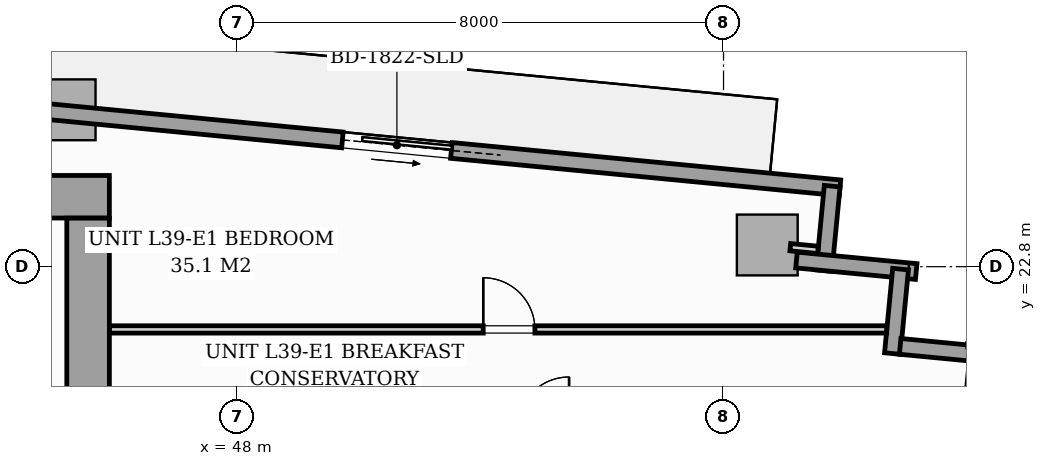
"""IFC4 building model, lengths in metres.
Left out: names, types, materials, properties, quantities, classifications, styles, units other than length and angle.
Written with IfcOpenShell. Run it as: python <this file> out.ifc"""

import sys

from ifc_helpers import new_model, si_unit, direction, frame, frame_2d, origin, origin_2d, place, context, subcontext, project, spatial, rectangle, i_section, extrude, source, transform, mapped, element, fill, save


model = new_model("IFC4")
c1 = context("Model", 3, precision=1e-05, world=origin(), true_north=direction((0.0, 1.0)))
c2 = subcontext(c1, "Body", "Model", "MODEL_VIEW")
j1 = project(units=[si_unit("LENGTHUNIT", "METRE"), si_unit("PLANEANGLEUNIT", "RADIAN")], contexts=[c1])
p1 = place(None, origin())
s1 = spatial("IfcSite", under=j1, at=p1, CompositionType="ELEMENT")
p2 = place(p1, origin())
s2 = spatial("IfcBuilding", under=s1, at=p2, CompositionType="ELEMENT")
p3 = place(p2, frame((0.0, 0.0, 137.4)))
s3 = spatial("IfcBuildingStorey", under=s2, at=p3, CompositionType="ELEMENT", Elevation=137.4)
m1 = source(origin(), c2, "Body", "SweptSolid", [
    extrude(i_section(OverallWidth=0.421, OverallDepth=0.465, WebThickness=0.045, FlangeThickness=0.073, FilletRadius=0.018, at=origin_2d()), origin(), (0.0, 0.0, 1.0), 3.196),
])
p4 = place(p3, frame((45.6, 24.0, 0.002), z_axis=(0.0, 0.0, 1.0), x_axis=(1.0, 0.0, 0.0)))
e1 = element("IfcColumn", 1, at=p4, inside=s3, PredefinedType="PILASTER", context=c2, shape_type="MappedRepresentation", body=[
    mapped(m1, transform((0.0, 0.0, 0.0), scale=1.0)),
])
m2 = source(origin(), c2, "Body", "SweptSolid", [
    extrude(rectangle(XDim=1.0, YDim=1.0, at=origin_2d()), origin(), (0.0, 0.0, 1.0), 3.196),
])
for number, where, z_axis, x_axis in (
    (2, (45.173, 25.38, 0.002), (0.0, 0.0, 1.0), (0.995, -0.096, 0.0)),
    (3, (56.719, 23.157, 0.002), (0.0, 0.0, 1.0), (0.995, -0.096, 0.0)),
):
    element("IfcColumn", number, at=place(p3, frame(where, z_axis=z_axis, x_axis=x_axis)), inside=s3, PredefinedType="COLUMN", context=c2, shape_type="MappedRepresentation", body=[
        mapped(m2, transform((0.0, 0.0, 0.0), scale=1.0)),
    ])
p5 = place(p3, frame((40.983, 25.727, 0.0), z_axis=(0.0, 0.0, 1.0), x_axis=(0.995395844771, -0.095849424686, 0.0)))
e4 = element("IfcWall", 4, at=p5, inside=s3, PredefinedType="STANDARD", context=c2, shape_type="SweptSolid", body=[
    extrude(rectangle(XDim=17.01, YDim=0.26, at=frame_2d((8.505, 0.0))), origin(), (0.0, 0.0, 1.0), 2.94),
])
p6 = place(p5, frame((8.79, 0.0, 0.0)))
e5 = element("IfcOpeningElement", 5, at=p6, cuts=e4, PredefinedType="OPENING", context=c2, shape_type="SweptSolid", body=[
    extrude(rectangle(XDim=1.8, YDim=2.06, at=frame_2d((0.9, 1.03))), frame((0.0, 0.14, 0.0), z_axis=(0.0, -1.0, 0.0), x_axis=(1.0, 0.0, 0.0)), (0.0, 0.0, 1.0), 0.28),
])
p7 = place(p5, frame((0.7, 0.0, 0.65)))
e6 = element("IfcOpeningElement", 6, at=p7, cuts=e4, PredefinedType="OPENING", context=c2, shape_type="SweptSolid", body=[
    extrude(rectangle(XDim=1.6, YDim=1.5, at=frame_2d((0.8, 0.75))), frame((0.0, 0.14, 0.0), z_axis=(0.0, -1.0, 0.0), x_axis=(1.0, 0.0, 0.0)), (0.0, 0.0, 1.0), 0.28),
])
p8 = place(p3, frame((57.787, 24.124, 0.0), z_axis=(0.0, 0.0, 1.0), x_axis=(-0.095915846097, -0.995389446633, 0.0)))
e7 = element("IfcWall", 7, at=p8, inside=s3, PredefinedType="STANDARD", context=c2, shape_type="SweptSolid", body=[
    extrude(rectangle(XDim=1.395, YDim=0.26, at=frame_2d((0.697, 0.0))), origin(), (0.0, 0.0, 1.0), 2.94),
])
p9 = place(p3, frame((57.2, 22.909, 0.0), z_axis=(0.0, 0.0, 1.0), x_axis=(0.995401789159, -0.095787672171, 0.0)))
e8 = element("IfcWall", 8, at=p9, inside=s3, PredefinedType="STANDARD", context=c2, shape_type="SweptSolid", body=[
    extrude(rectangle(XDim=1.978, YDim=0.26, at=frame_2d((0.989, 0.0))), origin(), (0.0, 0.0, 1.0), 2.94),
])
for number, where, z_axis, x_axis in (
    (9, (58.912, 22.76, 0.0), (0.0, 0.0, 1.0), (-0.096, -0.995, 0.0)),
    (10, (58.905, 21.49, 0.0), (0.0, 0.0, 1.0), (0.995, -0.096, 0.0)),
):
    element("IfcWall", number, at=place(p3, frame(where, z_axis=z_axis, x_axis=x_axis)), inside=s3, PredefinedType="STANDARD", context=c2, shape_type="SweptSolid", body=[
        extrude(rectangle(XDim=1.395, YDim=0.26, at=frame_2d((0.698, 0.0))), origin(), (0.0, 0.0, 1.0), 2.94),
    ])
p10 = place(p3, frame((26.1, 23.95, 0.0), z_axis=(0.0, 0.0, 1.0), x_axis=(1.0, 0.0, 0.0)))
e11 = element("IfcWall", 11, at=p10, inside=s3, PredefinedType="SHEAR", context=c2, shape_type="SweptSolid", body=[
    extrude(rectangle(XDim=19.8, YDim=0.7, at=frame_2d((9.9, 0.0))), origin(), (0.0, 0.0, 1.0), 3.2),
])
p11 = place(p3, frame((45.55, 17.802, 0.0), z_axis=(0.0, 0.0, 1.0), x_axis=(0.0, 1.0, 0.0)))
e12 = element("IfcWall", 12, at=p11, inside=s3, PredefinedType="SHEAR", context=c2, shape_type="SweptSolid", body=[
    extrude(rectangle(XDim=5.796, YDim=0.7, at=frame_2d((2.898, 0.0))), origin(), (0.0, 0.0, 1.0), 3.2),
])
p12 = place(p3, frame((45.902, 21.768, 0.0), z_axis=(0.0, 0.0, 1.0), x_axis=(1.0, 0.0, 0.0)))
e13 = element("IfcWall", 13, at=p12, inside=s3, PredefinedType="PARTITIONING", context=c2, shape_type="SweptSolid", body=[
    extrude(rectangle(XDim=12.781, YDim=0.12, at=frame_2d((6.391, 0.0))), origin(), (0.0, 0.0, 1.0), 2.94),
])
p13 = place(p12, frame((6.146, 0.0, 0.0)))
e14 = element("IfcOpeningElement", 14, at=p13, cuts=e13, PredefinedType="OPENING", context=c2, shape_type="SweptSolid", body=[
    extrude(rectangle(XDim=0.85, YDim=2.05, at=frame_2d((0.425, 1.025))), frame((0.0, 0.07, 0.0), z_axis=(0.0, -1.0, 0.0), x_axis=(1.0, 0.0, 0.0)), (0.0, 0.0, 1.0), 0.14),
])
p14 = place(p3, frame((57.098, 23.12, 0.0), z_axis=(0.0, 0.0, 1.0), x_axis=(0.995384576284, -0.09596637586, 0.0)))
e15 = element("IfcWall", 15, at=p14, inside=s3, PredefinedType="PARTITIONING", context=c2, shape_type="SweptSolid", body=[
    extrude(rectangle(XDim=0.458, YDim=0.12, at=frame_2d((0.229, 0.0))), origin(), (0.0, 0.0, 1.0), 2.94),
])
m3 = source(origin(), c2, "Body", "SweptSolid", [
    extrude(rectangle(XDim=1.8, YDim=2.06, at=frame_2d((0.9, 1.03))), frame((0.0, 0.025, 0.0), z_axis=(0.0, -1.0, 0.0), x_axis=(1.0, 0.0, 0.0)), (0.0, 0.0, 1.0), 0.05),
])
p15 = place(p6, origin())
e16 = element("IfcDoor", 16, at=p15, inside=s3, OperationType="SLIDING_TO_RIGHT", PredefinedType="DOOR", context=c2, shape_type="MappedRepresentation", body=[
    mapped(m3, transform((0.0, 0.0, 0.0), scale=1.0)),
])
fill(e5, e16)
m4 = source(origin(), c2, "Body", "SweptSolid", [
    extrude(rectangle(XDim=0.85, YDim=2.05, at=frame_2d((0.425, 1.025))), frame((0.0, 0.025, 0.0), z_axis=(0.0, -1.0, 0.0), x_axis=(1.0, 0.0, 0.0)), (0.0, 0.0, 1.0), 0.05),
])
p16 = place(p13, origin())
e17 = element("IfcDoor", 17, at=p16, inside=s3, OperationType="SINGLE_SWING_LEFT", PredefinedType="DOOR", context=c2, shape_type="MappedRepresentation", body=[
    mapped(m4, transform((0.0, 0.0, 0.0), scale=1.0)),
])
fill(e14, e17)
save(model, sys.argv[1])
